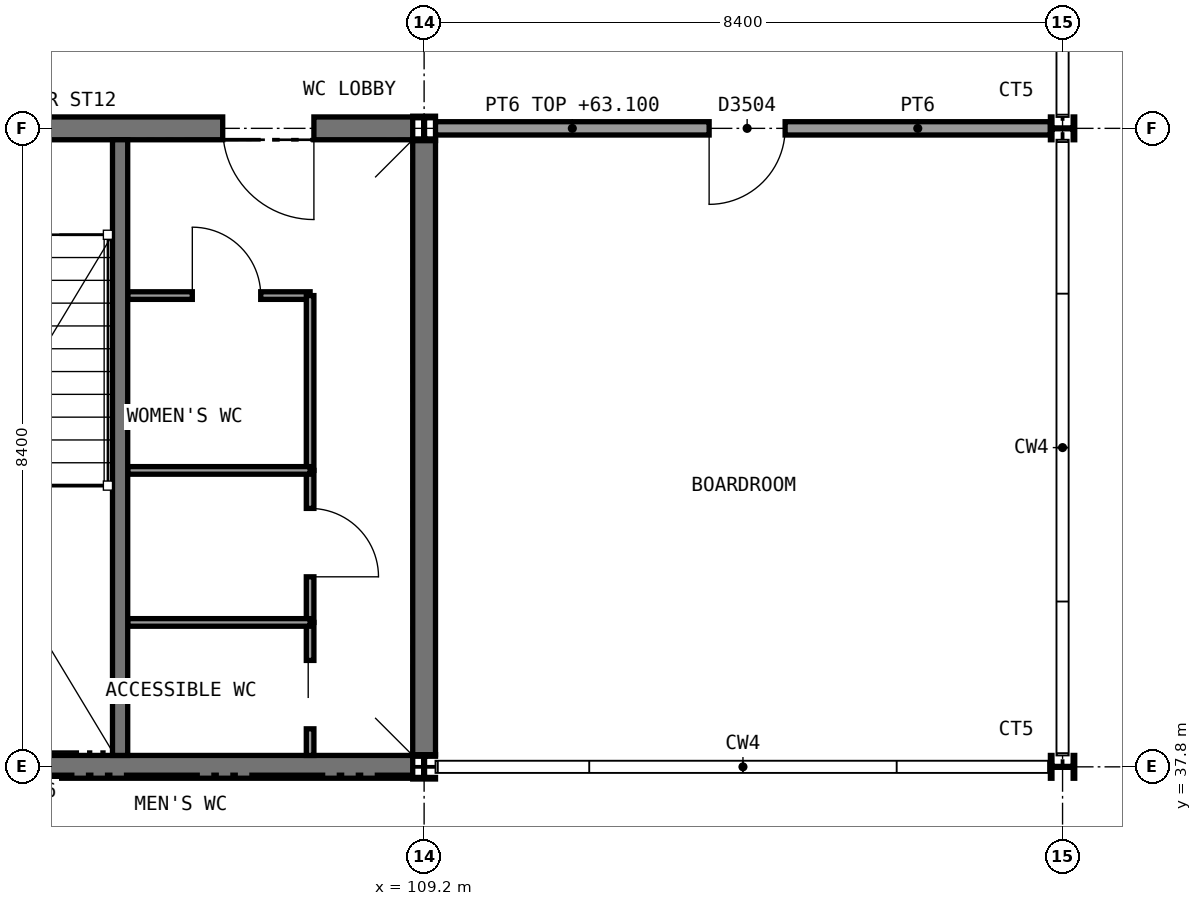
"""IFC4 building model, lengths in metres.
Left out: names, types, materials, properties, quantities, classifications, styles, units other than length and angle.
Written with IfcOpenShell. Run it as: python <this file> out.ifc"""

import sys

from ifc_helpers import new_model, si_unit, direction, frame, frame_2d, origin, origin_2d, place, context, subcontext, project, spatial, rectangle, i_section, extrude, element, fill, save


model = new_model("IFC4")
c1 = context("Model", 3, precision=1e-05, world=origin(), true_north=direction((0.0, 1.0)))
c2 = subcontext(c1, "Body", "Model", "MODEL_VIEW")
j1 = project(units=[si_unit("LENGTHUNIT", "METRE"), si_unit("PLANEANGLEUNIT", "RADIAN")], contexts=[c1])
p1 = place(None, origin())
s1 = spatial("IfcSite", under=j1, at=p1, CompositionType="ELEMENT")
p2 = place(p1, origin())
s2 = spatial("IfcBuilding", under=s1, at=p2, CompositionType="ELEMENT")
p3 = place(p2, frame((0.0, 0.0, 59.6)))
s3 = spatial("IfcBuildingStorey", under=s2, at=p3, CompositionType="ELEMENT", Elevation=59.6)
p4 = place(p3, frame((100.95, 37.8, 0.0), z_axis=(0.0, 0.0, 1.0), x_axis=(1.0, 0.0, 0.0)))
e1 = element("IfcWall", 1, at=p4, inside=s3, PredefinedType="SHEAR", context=c2, shape_type="SweptSolid", body=[
    extrude(rectangle(XDim=8.1, YDim=0.3, at=frame_2d((4.05, 0.0))), origin(), (0.0, 0.0, 1.0), 3.85),
])
p5 = place(p3, frame((100.95, 46.2, 0.0), z_axis=(0.0, 0.0, 1.0), x_axis=(1.0, 0.0, 0.0)))
e2 = element("IfcWall", 2, at=p5, inside=s3, PredefinedType="SHEAR", context=c2, shape_type="SweptSolid", body=[
    extrude(rectangle(XDim=8.1, YDim=0.3, at=frame_2d((4.05, 0.0))), origin(), (0.0, 0.0, 1.0), 3.85),
])
p6 = place(p5, frame((1.15, 0.0, 0.0)))
e3 = element("IfcOpeningElement", 3, at=p6, cuts=e2, PredefinedType="OPENING", context=c2, shape_type="SweptSolid", body=[
    extrude(rectangle(XDim=1.8, YDim=2.1, at=frame_2d((0.9, 1.05))), frame((0.0, 0.16, 0.0), z_axis=(0.0, -1.0, 0.0), x_axis=(1.0, 0.0, 0.0)), (0.0, 0.0, 1.0), 0.32),
])
p7 = place(p5, frame((5.6, 0.0, 0.0)))
e4 = element("IfcOpeningElement", 4, at=p7, cuts=e2, PredefinedType="OPENING", context=c2, shape_type="SweptSolid", body=[
    extrude(rectangle(XDim=1.2, YDim=2.1, at=frame_2d((0.6, 1.05))), frame((0.0, 0.16, 0.0), z_axis=(0.0, -1.0, 0.0), x_axis=(1.0, 0.0, 0.0)), (0.0, 0.0, 1.0), 0.32),
])
p8 = place(p3, frame((109.2, 37.96, 0.0), z_axis=(0.0, 0.0, 1.0), x_axis=(0.0, 1.0, 0.0)))
e5 = element("IfcWall", 5, at=p8, inside=s3, PredefinedType="SHEAR", context=c2, shape_type="SweptSolid", body=[
    extrude(rectangle(XDim=8.08, YDim=0.3, at=frame_2d((4.04, 0.0))), origin(), (0.0, 0.0, 1.0), 3.85),
])
for number, where, z_axis, x_axis in (
    (6, (109.2, 37.8, 0.0), (0.0, 0.0, 1.0), (1.0, 0.0, 0.0)),
    (7, (109.2, 46.2, 0.0), (0.0, 0.0, 1.0), (1.0, 0.0, 0.0)),
    (8, (117.6, 37.8, 0.0), (0.0, 0.0, 1.0), (0.0, 1.0, 0.0)),
    (9, (117.6, 46.2, 0.0), (0.0, 0.0, 1.0), (0.0, 1.0, 0.0)),
):
    element("IfcColumn", number, at=place(p3, frame(where, z_axis=z_axis, x_axis=x_axis)), inside=s3, PredefinedType="COLUMN", context=c2, shape_type="SweptSolid", body=[
        extrude(i_section(OverallWidth=0.3, OverallDepth=0.32, WebThickness=0.011, FlangeThickness=0.021, FilletRadius=0.027, at=origin_2d()), origin(), (0.0, 0.0, 1.0), 4.0),
    ])
p9 = place(p3, frame((105.3, 44.0, 0.0), z_axis=(0.0, 0.0, 1.0), x_axis=(1.0, 0.0, 0.0)))
e10 = element("IfcWall", 10, at=p9, inside=s3, PredefinedType="PARTITIONING", context=c2, shape_type="SweptSolid", body=[
    extrude(rectangle(XDim=2.4, YDim=0.1, at=frame_2d((1.2, 0.0))), origin(), (0.0, 0.0, 1.0), 3.78),
])
p10 = place(p9, frame((0.85, 0.0, 0.0)))
e11 = element("IfcOpeningElement", 11, at=p10, cuts=e10, PredefinedType="OPENING", context=c2, shape_type="SweptSolid", body=[
    extrude(rectangle(XDim=0.9, YDim=2.1, at=frame_2d((0.45, 1.05))), frame((0.0, 0.06, 0.0), z_axis=(0.0, -1.0, 0.0), x_axis=(1.0, 0.0, 0.0)), (0.0, 0.0, 1.0), 0.12),
])
p11 = place(p3, frame((107.7, 41.7, 0.0), z_axis=(0.0, 0.0, 1.0), x_axis=(0.0, 1.0, 0.0)))
e12 = element("IfcWall", 12, at=p11, inside=s3, PredefinedType="PARTITIONING", context=c2, shape_type="SweptSolid", body=[
    extrude(rectangle(XDim=2.3, YDim=0.1, at=frame_2d((1.15, 0.0))), origin(), (0.0, 0.0, 1.0), 3.78),
])
p12 = place(p3, frame((107.7, 39.7, 0.0), z_axis=(0.0, 0.0, 1.0), x_axis=(0.0, 1.0, 0.0)))
e13 = element("IfcWall", 13, at=p12, inside=s3, PredefinedType="PARTITIONING", context=c2, shape_type="SweptSolid", body=[
    extrude(rectangle(XDim=2.0, YDim=0.1, at=frame_2d((1.0, 0.0))), origin(), (0.0, 0.0, 1.0), 3.78),
])
p13 = place(p12, frame((0.6, 0.0, 0.0)))
e14 = element("IfcOpeningElement", 14, at=p13, cuts=e13, PredefinedType="OPENING", context=c2, shape_type="SweptSolid", body=[
    extrude(rectangle(XDim=0.9, YDim=2.1, at=frame_2d((0.45, 1.05))), frame((0.0, 0.06, 0.0), z_axis=(0.0, -1.0, 0.0), x_axis=(1.0, 0.0, 0.0)), (0.0, 0.0, 1.0), 0.12),
])
p14 = place(p3, frame((107.7, 37.95, 0.0), z_axis=(0.0, 0.0, 1.0), x_axis=(0.0, 1.0, 0.0)))
e15 = element("IfcWall", 15, at=p14, inside=s3, PredefinedType="PARTITIONING", context=c2, shape_type="SweptSolid", body=[
    extrude(rectangle(XDim=1.75, YDim=0.1, at=frame_2d((0.875, 0.0))), origin(), (0.0, 0.0, 1.0), 3.78),
])
p15 = place(p14, frame((0.35, 0.0, 0.0)))
e16 = element("IfcOpeningElement", 16, at=p15, cuts=e15, PredefinedType="OPENING", context=c2, shape_type="SweptSolid", body=[
    extrude(rectangle(XDim=0.9, YDim=2.1, at=frame_2d((0.45, 1.05))), frame((0.0, 0.06, 0.0), z_axis=(0.0, -1.0, 0.0), x_axis=(1.0, 0.0, 0.0)), (0.0, 0.0, 1.0), 0.12),
])
for number, where, z_axis, x_axis in (
    (17, (105.3, 41.7, 0.0), (0.0, 0.0, 1.0), (1.0, 0.0, 0.0)),
    (18, (105.3, 39.7, 0.0), (0.0, 0.0, 1.0), (1.0, 0.0, 0.0)),
):
    element("IfcWall", number, at=place(p3, frame(where, z_axis=z_axis, x_axis=x_axis)), inside=s3, PredefinedType="PARTITIONING", context=c2, shape_type="SweptSolid", body=[
        extrude(rectangle(XDim=2.4, YDim=0.1, at=frame_2d((1.2, 0.0))), origin(), (0.0, 0.0, 1.0), 3.78),
    ])
p16 = place(p3, frame((109.35, 46.2, 0.0), z_axis=(0.0, 0.0, 1.0), x_axis=(1.0, 0.0, 0.0)))
e19 = element("IfcWall", 19, at=p16, inside=s3, PredefinedType="PARTITIONING", context=c2, shape_type="SweptSolid", body=[
    extrude(rectangle(XDim=8.09, YDim=0.175, at=frame_2d((4.045, 0.0))), origin(), (0.0, 0.0, 1.0), 3.5),
])
p17 = place(p16, frame((3.6, 0.0, 0.0)))
e20 = element("IfcOpeningElement", 20, at=p17, cuts=e19, PredefinedType="OPENING", context=c2, shape_type="SweptSolid", body=[
    extrude(rectangle(XDim=1.0, YDim=2.1, at=frame_2d((0.5, 1.05))), frame((0.0, 0.098, 0.0), z_axis=(0.0, -1.0, 0.0), x_axis=(1.0, 0.0, 0.0)), (0.0, 0.0, 1.0), 0.195),
])
p18 = place(p3, frame((105.2, 37.95, 0.0), z_axis=(0.0, 0.0, 1.0), x_axis=(0.0, 1.0, 0.0)))
e21 = element("IfcWall", 21, at=p18, inside=s3, PredefinedType="SHEAR", context=c2, shape_type="SweptSolid", body=[
    extrude(rectangle(XDim=8.1, YDim=0.2, at=frame_2d((4.05, 0.0))), origin(), (0.0, 0.0, 1.0), 3.85),
])
p19 = place(p10, origin())
e22 = element("IfcDoor", 22, at=p19, inside=s3, OperationType="SINGLE_SWING_LEFT", PredefinedType="DOOR", context=c2, shape_type="SweptSolid", body=[
    extrude(rectangle(XDim=0.9, YDim=2.1, at=frame_2d((0.45, 1.05))), frame((0.0, 0.025, 0.0), z_axis=(0.0, -1.0, 0.0), x_axis=(1.0, 0.0, 0.0)), (0.0, 0.0, 1.0), 0.05),
])
fill(e11, e22)
p20 = place(p13, frame((0.9, 0.0, 0.0), z_axis=(0.0, 0.0, 1.0), x_axis=(-1.0, 0.0, 0.0)))
e23 = element("IfcDoor", 23, at=p20, inside=s3, OperationType="SINGLE_SWING_RIGHT", PredefinedType="DOOR", context=c2, shape_type="SweptSolid", body=[
    extrude(rectangle(XDim=0.9, YDim=2.1, at=frame_2d((0.45, 1.05))), frame((0.0, 0.025, 0.0), z_axis=(0.0, -1.0, 0.0), x_axis=(1.0, 0.0, 0.0)), (0.0, 0.0, 1.0), 0.05),
])
fill(e14, e23)
p21 = place(p15, origin())
e24 = element("IfcDoor", 24, at=p21, inside=s3, OperationType="SLIDING_TO_RIGHT", PredefinedType="DOOR", context=c2, shape_type="SweptSolid", body=[
    extrude(rectangle(XDim=0.9, YDim=2.1, at=frame_2d((0.45, 1.05))), frame((0.0, 0.025, 0.0), z_axis=(0.0, -1.0, 0.0), x_axis=(1.0, 0.0, 0.0)), (0.0, 0.0, 1.0), 0.05),
])
fill(e16, e24)
p22 = place(p17, frame((1.0, 0.0, 0.0), z_axis=(0.0, 0.0, 1.0), x_axis=(-1.0, 0.0, 0.0)))
e25 = element("IfcDoor", 25, at=p22, inside=s3, OperationType="SINGLE_SWING_RIGHT", PredefinedType="DOOR", context=c2, shape_type="SweptSolid", body=[
    extrude(rectangle(XDim=1.0, YDim=2.1, at=frame_2d((0.5, 1.05))), frame((0.0, 0.025, 0.0), z_axis=(0.0, -1.0, 0.0), x_axis=(1.0, 0.0, 0.0)), (0.0, 0.0, 1.0), 0.05),
])
fill(e20, e25)
p23 = place(p7, frame((1.2, 0.0, 0.0), z_axis=(0.0, 0.0, 1.0), x_axis=(-1.0, 0.0, 0.0)))
e26 = element("IfcDoor", 26, at=p23, inside=s3, OperationType="SINGLE_SWING_LEFT", PredefinedType="DOOR", context=c2, shape_type="SweptSolid", body=[
    extrude(rectangle(XDim=1.2, YDim=2.1, at=frame_2d((0.6, 1.05))), frame((0.0, 0.025, 0.0), z_axis=(0.0, -1.0, 0.0), x_axis=(1.0, 0.0, 0.0)), (0.0, 0.0, 1.0), 0.05),
])
fill(e4, e26)
save(model, sys.argv[1])
